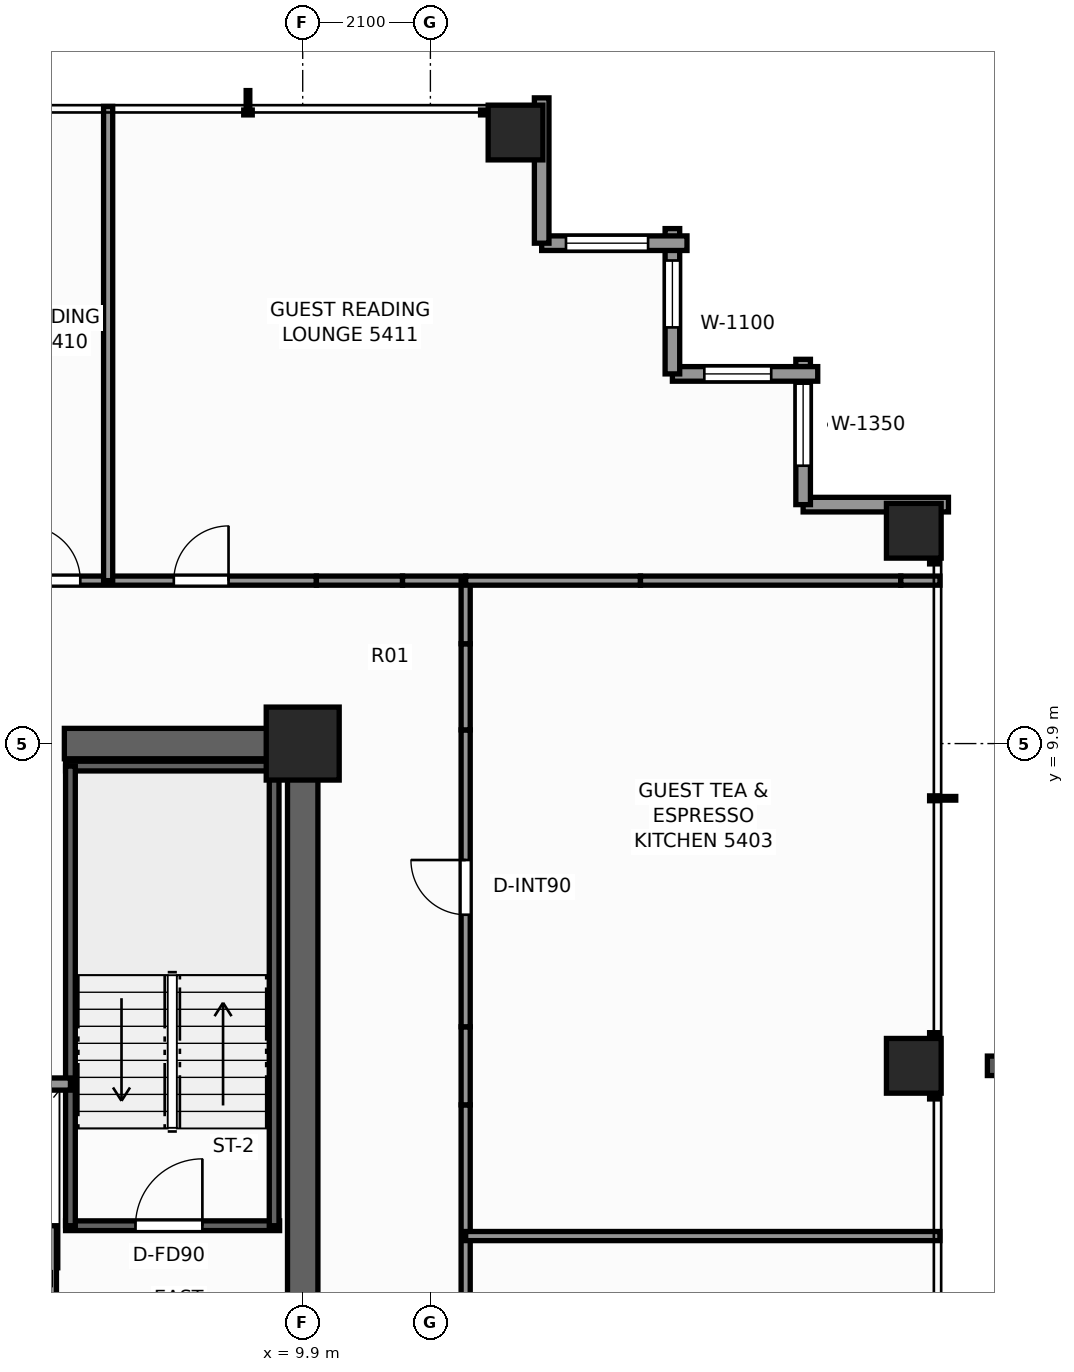
"""IFC4 building model, lengths in metres.
Left out: names, types, materials, properties, quantities, classifications, styles, units other than length and angle.
Written with IfcOpenShell. Run it as: python <this file> out.ifc"""

import sys

from ifc_helpers import new_model, si_unit, direction, frame, frame_2d, origin, origin_2d, place, context, subcontext, project, spatial, rectangle, extrude, element, fill, save


model = new_model("IFC4")
c1 = context("Model", 3, precision=1e-05, world=origin(), true_north=direction((0.0, 1.0)))
c2 = subcontext(c1, "Body", "Model", "MODEL_VIEW")
j1 = project(units=[si_unit("LENGTHUNIT", "METRE"), si_unit("PLANEANGLEUNIT", "RADIAN")], contexts=[c1])
p1 = place(None, origin())
s1 = spatial("IfcSite", under=j1, at=p1, CompositionType="ELEMENT")
p2 = place(p1, origin())
s2 = spatial("IfcBuilding", under=s1, at=p2, CompositionType="ELEMENT")
p3 = place(p2, frame((0.0, 0.0, 186.6)))
s3 = spatial("IfcBuildingStorey", under=s2, at=p3, CompositionType="ELEMENT", Elevation=186.6)
p4 = place(p3, frame((5.98, 9.9, 0.0), z_axis=(0.0, 0.0, 1.0), x_axis=(1.0, 0.0, 0.0)))
e1 = element("IfcWall", 1, at=p4, inside=s3, PredefinedType="SHEAR", context=c2, shape_type="SweptSolid", body=[
    extrude(rectangle(XDim=4.17, YDim=0.5, at=frame_2d((2.085, 0.0))), origin(), (0.0, 0.0, 1.0), 3.3),
])
p5 = place(p3, frame((9.9, -3.7, 0.0), z_axis=(0.0, 0.0, 1.0), x_axis=(0.0, 1.0, 0.0)))
e2 = element("IfcWall", 2, at=p5, inside=s3, PredefinedType="SHEAR", context=c2, shape_type="SweptSolid", body=[
    extrude(rectangle(XDim=13.35, YDim=0.5, at=frame_2d((6.675, 0.0))), origin(), (0.0, 0.0, 1.0), 3.3),
])
p6 = place(p5, frame((0.35, 0.0, 0.0)))
e3 = element("IfcOpeningElement", 3, at=p6, cuts=e2, PredefinedType="OPENING", context=c2, shape_type="SweptSolid", body=[
    extrude(rectangle(XDim=1.1, YDim=2.2, at=frame_2d((0.55, 1.1))), frame((0.0, 0.26, 0.0), z_axis=(0.0, -1.0, 0.0), x_axis=(1.0, 0.0, 0.0)), (0.0, 0.0, 1.0), 0.52),
])
p7 = place(p3, frame((9.9, 9.9, 0.0), z_axis=(0.0, 0.0, 1.0), x_axis=(1.0, 0.0, 0.0)))
e4 = element("IfcColumn", 4, at=p7, inside=s3, PredefinedType="COLUMN", context=c2, shape_type="SweptSolid", body=[
    extrude(rectangle(XDim=1.2, YDim=1.2, at=origin_2d()), origin(), (0.0, 0.0, 1.0), 3.3),
])
for number, where, z_axis, x_axis in (
    (5, (13.4, 19.95, 0.0), (0.0, 0.0, 1.0), (1.0, 0.0, 0.0)),
    (6, (19.95, 4.6, 0.0), (0.0, 0.0, 1.0), (1.0, 0.0, 0.0)),
    (7, (19.95, 13.4, 0.0), (0.0, 0.0, 1.0), (1.0, 0.0, 0.0)),
):
    element("IfcColumn", number, at=place(p3, frame(where, z_axis=z_axis, x_axis=x_axis)), inside=s3, PredefinedType="COLUMN", context=c2, shape_type="SweptSolid", body=[
        extrude(rectangle(XDim=0.9, YDim=0.9, at=origin_2d()), origin(), (0.0, 0.0, 1.0), 3.3),
    ])
p8 = place(p3, frame((18.13, 13.83, 0.0), z_axis=(0.0, 0.0, 1.0), x_axis=(1.0, 0.0, 0.0)))
e8 = element("IfcWall", 8, at=p8, inside=s3, PredefinedType="STANDARD", context=c2, shape_type="SweptSolid", body=[
    extrude(rectangle(XDim=2.39, YDim=0.24, at=frame_2d((1.195, 0.0))), origin(), (0.0, 0.0, 1.0), 1.275),
])
p9 = place(p3, frame((18.13, 16.22, 0.0), z_axis=(0.0, 0.0, 1.0), x_axis=(0.0, -1.0, 0.0)))
e9 = element("IfcWall", 9, at=p9, inside=s3, PredefinedType="STANDARD", context=c2, shape_type="SweptSolid", body=[
    extrude(rectangle(XDim=2.39, YDim=0.24, at=frame_2d((1.195, 0.0))), origin(), (0.0, 0.0, 1.0), 2.463),
])
p10 = place(p9, frame((0.4, 0.0, 0.65)))
e10 = element("IfcOpeningElement", 10, at=p10, cuts=e9, PredefinedType="OPENING", context=c2, shape_type="SweptSolid", body=[
    extrude(rectangle(XDim=1.35, YDim=1.55, at=frame_2d((0.675, 0.775))), frame((0.0, 0.13, 0.0), z_axis=(0.0, -1.0, 0.0), x_axis=(1.0, 0.0, 0.0)), (0.0, 0.0, 1.0), 0.26),
])
p11 = place(p3, frame((15.98, 15.98, 0.0), z_axis=(0.0, 0.0, 1.0), x_axis=(1.0, 0.0, 0.0)))
e11 = element("IfcWall", 11, at=p11, inside=s3, PredefinedType="STANDARD", context=c2, shape_type="SweptSolid", body=[
    extrude(rectangle(XDim=2.39, YDim=0.24, at=frame_2d((1.195, 0.0))), origin(), (0.0, 0.0, 1.0), 2.463),
])
p12 = place(p11, frame((0.525, 0.0, 0.65)))
e12 = element("IfcOpeningElement", 12, at=p12, cuts=e11, PredefinedType="OPENING", context=c2, shape_type="SweptSolid", body=[
    extrude(rectangle(XDim=1.1, YDim=1.45, at=frame_2d((0.55, 0.725))), frame((0.0, 0.13, 0.0), z_axis=(0.0, -1.0, 0.0), x_axis=(1.0, 0.0, 0.0)), (0.0, 0.0, 1.0), 0.26),
])
p13 = place(p3, frame((15.98, 18.37, 0.0), z_axis=(0.0, 0.0, 1.0), x_axis=(0.0, -1.0, 0.0)))
e13 = element("IfcWall", 13, at=p13, inside=s3, PredefinedType="STANDARD", context=c2, shape_type="SweptSolid", body=[
    extrude(rectangle(XDim=2.39, YDim=0.24, at=frame_2d((1.195, 0.0))), origin(), (0.0, 0.0, 1.0), 2.463),
])
p14 = place(p13, frame((0.525, 0.0, 0.65)))
e14 = element("IfcOpeningElement", 14, at=p14, cuts=e13, PredefinedType="OPENING", context=c2, shape_type="SweptSolid", body=[
    extrude(rectangle(XDim=1.1, YDim=1.45, at=frame_2d((0.55, 0.725))), frame((0.0, 0.13, 0.0), z_axis=(0.0, -1.0, 0.0), x_axis=(1.0, 0.0, 0.0)), (0.0, 0.0, 1.0), 0.26),
])
p15 = place(p3, frame((13.83, 18.13, 0.0), z_axis=(0.0, 0.0, 1.0), x_axis=(1.0, 0.0, 0.0)))
e15 = element("IfcWall", 15, at=p15, inside=s3, PredefinedType="STANDARD", context=c2, shape_type="SweptSolid", body=[
    extrude(rectangle(XDim=2.39, YDim=0.24, at=frame_2d((1.195, 0.0))), origin(), (0.0, 0.0, 1.0), 2.463),
])
p16 = place(p15, frame((0.4, 0.0, 0.65)))
e16 = element("IfcOpeningElement", 16, at=p16, cuts=e15, PredefinedType="OPENING", context=c2, shape_type="SweptSolid", body=[
    extrude(rectangle(XDim=1.35, YDim=1.55, at=frame_2d((0.675, 0.775))), frame((0.0, 0.13, 0.0), z_axis=(0.0, -1.0, 0.0), x_axis=(1.0, 0.0, 0.0)), (0.0, 0.0, 1.0), 0.26),
])
p17 = place(p3, frame((13.83, 20.52, 0.0), z_axis=(0.0, 0.0, 1.0), x_axis=(0.0, -1.0, 0.0)))
e17 = element("IfcWall", 17, at=p17, inside=s3, PredefinedType="STANDARD", context=c2, shape_type="SweptSolid", body=[
    extrude(rectangle(XDim=2.39, YDim=0.24, at=frame_2d((1.195, 0.0))), origin(), (0.0, 0.0, 1.0), 1.275),
])
p18 = place(p3, frame((6.0, 1.97, 0.0), z_axis=(0.0, 0.0, 1.0), x_axis=(1.0, 0.0, 0.0)))
e18 = element("IfcWall", 18, at=p18, inside=s3, PredefinedType="SHEAR", context=c2, shape_type="SweptSolid", body=[
    extrude(rectangle(XDim=3.52, YDim=0.16, at=frame_2d((1.76, 0.0))), origin(), (0.0, 0.0, 1.0), 3.3),
])
p19 = place(p18, frame((1.15, 0.0, 0.0)))
e19 = element("IfcOpeningElement", 19, at=p19, cuts=e18, PredefinedType="OPENING", context=c2, shape_type="SweptSolid", body=[
    extrude(rectangle(XDim=1.1, YDim=2.2, at=frame_2d((0.55, 1.1))), frame((0.0, 0.09, 0.0), z_axis=(0.0, -1.0, 0.0), x_axis=(1.0, 0.0, 0.0)), (0.0, 0.0, 1.0), 0.18),
])
p20 = place(p3, frame((6.0, 9.53, 0.0), z_axis=(0.0, 0.0, 1.0), x_axis=(1.0, 0.0, 0.0)))
e20 = element("IfcWall", 20, at=p20, inside=s3, PredefinedType="SHEAR", context=c2, shape_type="SweptSolid", body=[
    extrude(rectangle(XDim=3.52, YDim=0.16, at=frame_2d((1.76, 0.0))), origin(), (0.0, 0.0, 1.0), 3.3),
])
for number, where, z_axis, x_axis in (
    (21, (6.08, 1.97, 0.0), (0.0, 0.0, 1.0), (0.0, 1.0, 0.0)),
    (22, (9.43, 1.97, 0.0), (0.0, 0.0, 1.0), (0.0, 1.0, 0.0)),
):
    element("IfcWall", number, at=place(p3, frame(where, z_axis=z_axis, x_axis=x_axis)), inside=s3, PredefinedType="SHEAR", context=c2, shape_type="SweptSolid", body=[
        extrude(rectangle(XDim=7.56, YDim=0.16, at=frame_2d((3.78, 0.0))), origin(), (0.0, 0.0, 1.0), 3.3),
    ])
p21 = place(p3, frame((5.75, -3.6, 0.0), z_axis=(0.0, 0.0, 1.0), x_axis=(0.0, 1.0, 0.0)))
e23 = element("IfcWall", 23, at=p21, inside=s3, PredefinedType="SOLIDWALL", context=c2, shape_type="SweptSolid", body=[
    extrude(rectangle(XDim=5.57, YDim=0.2, at=frame_2d((2.785, 0.0))), origin(), (0.0, 0.0, 1.0), 2.715),
])
p22 = place(p21, frame((2.75, 0.0, 0.0)))
e24 = element("IfcOpeningElement", 24, at=p22, cuts=e23, PredefinedType="OPENING", context=c2, shape_type="SweptSolid", body=[
    extrude(rectangle(XDim=1.1, YDim=2.2, at=frame_2d((0.55, 1.1))), frame((0.0, 0.11, 0.0), z_axis=(0.0, -1.0, 0.0), x_axis=(1.0, 0.0, 0.0)), (0.0, 0.0, 1.0), 0.22),
])
p23 = place(p3, frame((3.35, 4.3, 0.0), z_axis=(0.0, 0.0, 1.0), x_axis=(1.0, 0.0, 0.0)))
e25 = element("IfcWall", 25, at=p23, inside=s3, PredefinedType="SOLIDWALL", context=c2, shape_type="SweptSolid", body=[
    extrude(rectangle(XDim=2.73, YDim=0.2, at=frame_2d((1.365, 0.0))), origin(), (0.0, 0.0, 1.0), 3.08),
])
p24 = place(p23, frame((0.75, 0.0, 0.0)))
e26 = element("IfcOpeningElement", 26, at=p24, cuts=e25, PredefinedType="OPENING", context=c2, shape_type="SweptSolid", body=[
    extrude(rectangle(XDim=1.2, YDim=2.25, at=frame_2d((0.6, 1.125))), frame((0.0, 0.11, 0.0), z_axis=(0.0, -1.0, 0.0), x_axis=(1.0, 0.0, 0.0)), (0.0, 0.0, 1.0), 0.22),
])
p25 = place(p3, frame((5.242, 12.58, 0.0), z_axis=(0.0, 0.0, 1.0), x_axis=(1.0, 0.0, 0.0)))
e27 = element("IfcWall", 27, at=p25, inside=s3, PredefinedType="PARTITIONING", context=c2, shape_type="SweptSolid", body=[
    extrude(rectangle(XDim=4.883, YDim=0.15, at=frame_2d((2.441, 0.0))), origin(), (0.0, 0.0, 1.0), 3.08),
])
p26 = place(p25, frame((0.1, 0.0, 0.0)))
e28 = element("IfcOpeningElement", 28, at=p26, cuts=e27, PredefinedType="OPENING", context=c2, shape_type="SweptSolid", body=[
    extrude(rectangle(XDim=0.9, YDim=2.06, at=frame_2d((0.45, 1.03))), frame((0.0, 0.085, 0.0), z_axis=(0.0, -1.0, 0.0), x_axis=(1.0, 0.0, 0.0)), (0.0, 0.0, 1.0), 0.17),
])
p27 = place(p25, frame((2.538, 0.0, 0.0)))
e29 = element("IfcOpeningElement", 29, at=p27, cuts=e27, PredefinedType="OPENING", context=c2, shape_type="SweptSolid", body=[
    extrude(rectangle(XDim=0.9, YDim=2.06, at=frame_2d((0.45, 1.03))), frame((0.0, 0.085, 0.0), z_axis=(0.0, -1.0, 0.0), x_axis=(1.0, 0.0, 0.0)), (0.0, 0.0, 1.0), 0.17),
])
p28 = place(p3, frame((10.125, 12.58, 0.0), z_axis=(0.0, 0.0, 1.0), x_axis=(1.0, 0.0, 0.0)))
e30 = element("IfcWall", 30, at=p28, inside=s3, PredefinedType="PARTITIONING", context=c2, shape_type="SweptSolid", body=[
    extrude(rectangle(XDim=1.417, YDim=0.15, at=frame_2d((0.708, 0.0))), origin(), (0.0, 0.0, 1.0), 1.265),
])
p29 = place(p3, frame((11.542, 12.58, 0.0), z_axis=(0.0, 0.0, 1.0), x_axis=(1.0, 0.0, 0.0)))
e31 = element("IfcWall", 31, at=p29, inside=s3, PredefinedType="PARTITIONING", context=c2, shape_type="SweptSolid", body=[
    extrude(rectangle(XDim=1.038, YDim=0.15, at=frame_2d((0.519, 0.0))), origin(), (0.0, 0.0, 1.0), 3.08),
])
p30 = place(p3, frame((12.58, -3.958, 0.0), z_axis=(0.0, 0.0, 1.0), x_axis=(0.0, 1.0, 0.0)))
e32 = element("IfcWall", 32, at=p30, inside=s3, PredefinedType="PARTITIONING", context=c2, shape_type="SweptSolid", body=[
    extrude(rectangle(XDim=7.916, YDim=0.15, at=frame_2d((3.958, 0.0))), origin(), (0.0, 0.0, 1.0), 2.369),
])
p31 = place(p3, frame((12.58, 3.958, 0.0), z_axis=(0.0, 0.0, 1.0), x_axis=(0.0, 1.0, 0.0)))
e33 = element("IfcWall", 33, at=p31, inside=s3, PredefinedType="PARTITIONING", context=c2, shape_type="SweptSolid", body=[
    extrude(rectangle(XDim=1.284, YDim=0.15, at=frame_2d((0.642, 0.0))), origin(), (0.0, 0.0, 1.0), 1.265),
])
p32 = place(p3, frame((12.58, 5.242, 0.0), z_axis=(0.0, 0.0, 1.0), x_axis=(0.0, 1.0, 0.0)))
e34 = element("IfcWall", 34, at=p32, inside=s3, PredefinedType="PARTITIONING", context=c2, shape_type="SweptSolid", body=[
    extrude(rectangle(XDim=4.883, YDim=0.15, at=frame_2d((2.441, 0.0))), origin(), (0.0, 0.0, 1.0), 3.08),
])
p33 = place(p32, frame((1.843, 0.0, 0.0)))
e35 = element("IfcOpeningElement", 35, at=p33, cuts=e34, PredefinedType="OPENING", context=c2, shape_type="SweptSolid", body=[
    extrude(rectangle(XDim=0.9, YDim=2.06, at=frame_2d((0.45, 1.03))), frame((0.0, 0.085, 0.0), z_axis=(0.0, -1.0, 0.0), x_axis=(1.0, 0.0, 0.0)), (0.0, 0.0, 1.0), 0.17),
])
p34 = place(p3, frame((12.58, 10.125, 0.0), z_axis=(0.0, 0.0, 1.0), x_axis=(0.0, 1.0, 0.0)))
e36 = element("IfcWall", 36, at=p34, inside=s3, PredefinedType="PARTITIONING", context=c2, shape_type="SweptSolid", body=[
    extrude(rectangle(XDim=1.417, YDim=0.15, at=frame_2d((0.708, 0.0))), origin(), (0.0, 0.0, 1.0), 1.265),
])
p35 = place(p3, frame((12.58, 11.542, 0.0), z_axis=(0.0, 0.0, 1.0), x_axis=(0.0, 1.0, 0.0)))
e37 = element("IfcWall", 37, at=p35, inside=s3, PredefinedType="PARTITIONING", context=c2, shape_type="SweptSolid", body=[
    extrude(rectangle(XDim=1.038, YDim=0.15, at=frame_2d((0.519, 0.0))), origin(), (0.0, 0.0, 1.0), 3.08),
])
p36 = place(p3, frame((12.58, 12.58, 0.0), z_axis=(0.0, 0.0, 1.0), x_axis=(1.0, 0.0, 0.0)))
e38 = element("IfcWall", 38, at=p36, inside=s3, PredefinedType="PARTITIONING", context=c2, shape_type="SweptSolid", body=[
    extrude(rectangle(XDim=2.875, YDim=0.15, at=frame_2d((1.438, 0.0))), origin(), (0.0, 0.0, 1.0), 3.08),
])
p37 = place(p3, frame((15.455, 12.58, 0.0), z_axis=(0.0, 0.0, 1.0), x_axis=(1.0, 0.0, 0.0)))
e39 = element("IfcWall", 39, at=p37, inside=s3, PredefinedType="PARTITIONING", context=c2, shape_type="SweptSolid", body=[
    extrude(rectangle(XDim=4.281, YDim=0.15, at=frame_2d((2.141, 0.0))), origin(), (0.0, 0.0, 1.0), 1.265),
])
p38 = place(p3, frame((19.736, 12.58, 0.0), z_axis=(0.0, 0.0, 1.0), x_axis=(1.0, 0.0, 0.0)))
e40 = element("IfcWall", 40, at=p38, inside=s3, PredefinedType="PARTITIONING", context=c2, shape_type="SweptSolid", body=[
    extrude(rectangle(XDim=0.644, YDim=0.15, at=frame_2d((0.322, 0.0))), origin(), (0.0, 0.0, 1.0), 2.453),
])
for number, where, z_axis, x_axis in (
    (41, (12.58, 1.8, 0.0), (0.0, 0.0, 1.0), (1.0, 0.0, 0.0)),
    (42, (6.7, 12.58, 0.0), (0.0, 0.0, 1.0), (0.0, 1.0, 0.0)),
):
    element("IfcWall", number, at=place(p3, frame(where, z_axis=z_axis, x_axis=x_axis)), inside=s3, PredefinedType="PARTITIONING", context=c2, shape_type="SweptSolid", body=[
        extrude(rectangle(XDim=7.8, YDim=0.15, at=frame_2d((3.9, 0.0))), origin(), (0.0, 0.0, 1.0), 2.453),
    ])
p39 = place(p10, origin())
e43 = element("IfcWindow", 43, at=p39, inside=s3, PartitioningType="SINGLE_PANEL", PredefinedType="WINDOW", context=c2, shape_type="SweptSolid", body=[
    extrude(rectangle(XDim=1.35, YDim=1.55, at=frame_2d((0.675, 0.775))), frame((0.0, 0.03, 0.0), z_axis=(0.0, -1.0, 0.0), x_axis=(1.0, 0.0, 0.0)), (0.0, 0.0, 1.0), 0.06),
])
fill(e10, e43)
p40 = place(p12, origin())
e44 = element("IfcWindow", 44, at=p40, inside=s3, PartitioningType="SINGLE_PANEL", PredefinedType="WINDOW", context=c2, shape_type="SweptSolid", body=[
    extrude(rectangle(XDim=1.1, YDim=1.45, at=frame_2d((0.55, 0.725))), frame((0.0, 0.03, 0.0), z_axis=(0.0, -1.0, 0.0), x_axis=(1.0, 0.0, 0.0)), (0.0, 0.0, 1.0), 0.06),
])
fill(e12, e44)
p41 = place(p14, origin())
e45 = element("IfcWindow", 45, at=p41, inside=s3, PartitioningType="SINGLE_PANEL", PredefinedType="WINDOW", context=c2, shape_type="SweptSolid", body=[
    extrude(rectangle(XDim=1.1, YDim=1.45, at=frame_2d((0.55, 0.725))), frame((0.0, 0.03, 0.0), z_axis=(0.0, -1.0, 0.0), x_axis=(1.0, 0.0, 0.0)), (0.0, 0.0, 1.0), 0.06),
])
fill(e14, e45)
p42 = place(p16, origin())
e46 = element("IfcWindow", 46, at=p42, inside=s3, PartitioningType="SINGLE_PANEL", PredefinedType="WINDOW", context=c2, shape_type="SweptSolid", body=[
    extrude(rectangle(XDim=1.35, YDim=1.55, at=frame_2d((0.675, 0.775))), frame((0.0, 0.03, 0.0), z_axis=(0.0, -1.0, 0.0), x_axis=(1.0, 0.0, 0.0)), (0.0, 0.0, 1.0), 0.06),
])
fill(e16, e46)
p43 = place(p19, origin())
e47 = element("IfcDoor", 47, at=p43, inside=s3, OperationType="SINGLE_SWING_RIGHT", PredefinedType="DOOR", context=c2, shape_type="SweptSolid", body=[
    extrude(rectangle(XDim=1.1, YDim=2.2, at=frame_2d((0.55, 1.1))), frame((0.0, 0.025, 0.0), z_axis=(0.0, -1.0, 0.0), x_axis=(1.0, 0.0, 0.0)), (0.0, 0.0, 1.0), 0.05),
])
fill(e19, e47)
p44 = place(p33, origin())
e48 = element("IfcDoor", 48, at=p44, inside=s3, OperationType="SINGLE_SWING_RIGHT", PredefinedType="DOOR", context=c2, shape_type="SweptSolid", body=[
    extrude(rectangle(XDim=0.9, YDim=2.06, at=frame_2d((0.45, 1.03))), frame((0.0, 0.025, 0.0), z_axis=(0.0, -1.0, 0.0), x_axis=(1.0, 0.0, 0.0)), (0.0, 0.0, 1.0), 0.05),
])
fill(e35, e48)
p45 = place(p26, origin())
e49 = element("IfcDoor", 49, at=p45, inside=s3, OperationType="SINGLE_SWING_LEFT", PredefinedType="DOOR", context=c2, shape_type="SweptSolid", body=[
    extrude(rectangle(XDim=0.9, YDim=2.06, at=frame_2d((0.45, 1.03))), frame((0.0, 0.025, 0.0), z_axis=(0.0, -1.0, 0.0), x_axis=(1.0, 0.0, 0.0)), (0.0, 0.0, 1.0), 0.05),
])
fill(e28, e49)
p46 = place(p27, origin())
e50 = element("IfcDoor", 50, at=p46, inside=s3, OperationType="SINGLE_SWING_RIGHT", PredefinedType="DOOR", context=c2, shape_type="SweptSolid", body=[
    extrude(rectangle(XDim=0.9, YDim=2.06, at=frame_2d((0.45, 1.03))), frame((0.0, 0.025, 0.0), z_axis=(0.0, -1.0, 0.0), x_axis=(1.0, 0.0, 0.0)), (0.0, 0.0, 1.0), 0.05),
])
fill(e29, e50)
save(model, sys.argv[1])
